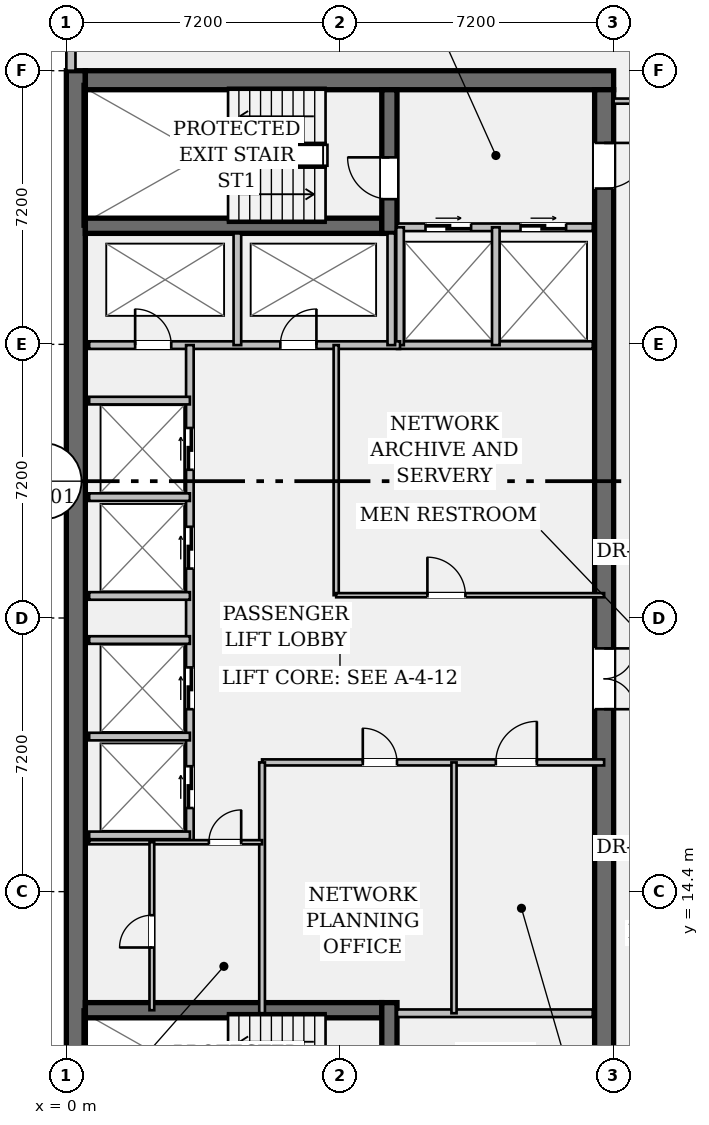
"""IFC4 building model, lengths in metres.
Left out: names, types, materials, properties, quantities, classifications, styles, units other than length and angle.
Written with IfcOpenShell. Run it as: python <this file> out.ifc"""

import sys

from ifc_helpers import new_model, si_unit, direction, frame, frame_2d, origin, place, context, subcontext, project, spatial, rectangle, extrude, element, fill, save


model = new_model("IFC4")
c1 = context("Model", 3, precision=1e-05, world=origin(), true_north=direction((0.0, 1.0)))
c2 = subcontext(c1, "Body", "Model", "MODEL_VIEW")
j1 = project(units=[si_unit("LENGTHUNIT", "METRE"), si_unit("PLANEANGLEUNIT", "RADIAN")], contexts=[c1])
p1 = place(None, origin())
s1 = spatial("IfcSite", under=j1, at=p1, CompositionType="ELEMENT")
p2 = place(p1, origin())
s2 = spatial("IfcBuilding", under=s1, at=p2, CompositionType="ELEMENT")
p3 = place(p2, frame((0.0, 0.0, 222.25)))
s3 = spatial("IfcBuildingStorey", under=s2, at=p3, CompositionType="ELEMENT", Elevation=222.25)
p4 = place(p3, frame((0.25, 7.2, 0.0), z_axis=(0.0, 0.0, 1.0), x_axis=(0.0, 1.0, 0.0)))
e1 = element("IfcWall", 1, at=p4, inside=s3, PredefinedType="SHEAR", context=c2, shape_type="SweptSolid", body=[
    extrude(rectangle(XDim=28.8, YDim=0.5, at=frame_2d((14.4, 0.0))), origin(), (0.0, 0.0, 1.0), 3.24),
])
p5 = place(p3, frame((0.5, 35.75, 0.0), z_axis=(0.0, 0.0, 1.0), x_axis=(1.0, 0.0, 0.0)))
e2 = element("IfcWall", 2, at=p5, inside=s3, PredefinedType="SHEAR", context=c2, shape_type="SweptSolid", body=[
    extrude(rectangle(XDim=13.9, YDim=0.5, at=frame_2d((6.95, 0.0))), origin(), (0.0, 0.0, 1.0), 3.24),
])
p6 = place(p3, frame((14.15, 35.5, 0.0), z_axis=(0.0, 0.0, 1.0), x_axis=(0.0, -1.0, 0.0)))
e3 = element("IfcWall", 3, at=p6, inside=s3, PredefinedType="SHEAR", context=c2, shape_type="SweptSolid", body=[
    extrude(rectangle(XDim=27.8, YDim=0.5, at=frame_2d((13.9, 0.0))), origin(), (0.0, 0.0, 1.0), 3.24),
])
p7 = place(p6, frame((1.4, 0.0, 0.0)))
e4 = element("IfcOpeningElement", 4, at=p7, cuts=e3, PredefinedType="OPENING", context=c2, shape_type="SweptSolid", body=[
    extrude(rectangle(XDim=1.2, YDim=2.15, at=frame_2d((0.6, 1.075))), frame((0.0, 0.262, 0.0), z_axis=(0.0, -1.0, 0.0), x_axis=(1.0, 0.0, 0.0)), (0.0, 0.0, 1.0), 0.524),
])
p8 = place(p6, frame((25.35, 0.0, 0.0)))
e5 = element("IfcOpeningElement", 5, at=p8, cuts=e3, PredefinedType="OPENING", context=c2, shape_type="SweptSolid", body=[
    extrude(rectangle(XDim=1.2, YDim=2.15, at=frame_2d((0.6, 1.075))), frame((0.0, 0.262, 0.0), z_axis=(0.0, -1.0, 0.0), x_axis=(1.0, 0.0, 0.0)), (0.0, 0.0, 1.0), 0.524),
])
p9 = place(p6, frame((14.7, 0.0, 0.0)))
e6 = element("IfcOpeningElement", 6, at=p9, cuts=e3, PredefinedType="OPENING", context=c2, shape_type="SweptSolid", body=[
    extrude(rectangle(XDim=1.6, YDim=2.2, at=frame_2d((0.8, 1.1))), frame((0.0, 0.262, 0.0), z_axis=(0.0, -1.0, 0.0), x_axis=(1.0, 0.0, 0.0)), (0.0, 0.0, 1.0), 0.524),
])
for number, where, z_axis, x_axis in (
    (7, (0.5, 31.92, 0.0), (0.0, 0.0, 1.0), (1.0, 0.0, 0.0)),
    (8, (0.5, 11.28, 0.0), (0.0, 0.0, 1.0), (1.0, 0.0, 0.0)),
):
    element("IfcWall", number, at=place(p3, frame(where, z_axis=z_axis, x_axis=x_axis)), inside=s3, PredefinedType="SHEAR", context=c2, shape_type="SweptSolid", body=[
        extrude(rectangle(XDim=7.8, YDim=0.4, at=frame_2d((3.9, 0.0))), origin(), (0.0, 0.0, 1.0), 3.24),
    ])
p10 = place(p3, frame((8.5, 31.72, 0.0), z_axis=(0.0, 0.0, 1.0), x_axis=(0.0, 1.0, 0.0)))
e9 = element("IfcWall", 9, at=p10, inside=s3, PredefinedType="SHEAR", context=c2, shape_type="SweptSolid", body=[
    extrude(rectangle(XDim=3.78, YDim=0.4, at=frame_2d((1.89, 0.0))), origin(), (0.0, 0.0, 1.0), 3.24),
])
p11 = place(p10, frame((0.9, 0.0, 0.0)))
e10 = element("IfcOpeningElement", 10, at=p11, cuts=e9, PredefinedType="OPENING", context=c2, shape_type="SweptSolid", body=[
    extrude(rectangle(XDim=1.1, YDim=2.15, at=frame_2d((0.55, 1.075))), frame((0.0, 0.212, 0.0), z_axis=(0.0, -1.0, 0.0), x_axis=(1.0, 0.0, 0.0)), (0.0, 0.0, 1.0), 0.424),
])
p12 = place(p3, frame((8.5, 7.7, 0.0), z_axis=(0.0, 0.0, 1.0), x_axis=(0.0, 1.0, 0.0)))
e11 = element("IfcWall", 11, at=p12, inside=s3, PredefinedType="SHEAR", context=c2, shape_type="SweptSolid", body=[
    extrude(rectangle(XDim=3.78, YDim=0.4, at=frame_2d((1.89, 0.0))), origin(), (0.0, 0.0, 1.0), 3.24),
])
p13 = place(p12, frame((0.85, 0.0, 0.0)))
e12 = element("IfcOpeningElement", 12, at=p13, cuts=e11, PredefinedType="OPENING", context=c2, shape_type="SweptSolid", body=[
    extrude(rectangle(XDim=1.1, YDim=2.15, at=frame_2d((0.55, 1.075))), frame((0.0, 0.212, 0.0), z_axis=(0.0, -1.0, 0.0), x_axis=(1.0, 0.0, 0.0)), (0.0, 0.0, 1.0), 0.424),
])
p14 = place(p3, frame((0.12, 36.0, 0.0), z_axis=(0.0, 0.0, 1.0), x_axis=(0.0, 1.0, 0.0)))
e13 = element("IfcWall", 13, at=p14, inside=s3, PredefinedType="STANDARD", context=c2, shape_type="SweptSolid", body=[
    extrude(rectangle(XDim=1.21, YDim=0.24, at=frame_2d((0.605, 0.0))), origin(), (0.0, 0.0, 1.0), 3.24),
])
p15 = place(p3, frame((8.7, 31.88, 0.0), z_axis=(0.0, 0.0, 1.0), x_axis=(1.0, 0.0, 0.0)))
e14 = element("IfcWall", 14, at=p15, inside=s3, PredefinedType="PARTITIONING", context=c2, shape_type="SweptSolid", body=[
    extrude(rectangle(XDim=5.15, YDim=0.2, at=frame_2d((2.575, 0.0))), origin(), (0.0, 0.0, 1.0), 3.24),
])
p16 = place(p15, frame((0.75, 0.0, 0.0)))
e15 = element("IfcOpeningElement", 15, at=p16, cuts=e14, PredefinedType="OPENING", context=c2, shape_type="SweptSolid", body=[
    extrude(rectangle(XDim=1.2, YDim=2.2, at=frame_2d((0.6, 1.1))), frame((0.0, 0.112, 0.0), z_axis=(0.0, -1.0, 0.0), x_axis=(1.0, 0.0, 0.0)), (0.0, 0.0, 1.0), 0.224),
])
p17 = place(p15, frame((3.25, 0.0, 0.0)))
e16 = element("IfcOpeningElement", 16, at=p17, cuts=e14, PredefinedType="OPENING", context=c2, shape_type="SweptSolid", body=[
    extrude(rectangle(XDim=1.2, YDim=2.2, at=frame_2d((0.6, 1.1))), frame((0.0, 0.112, 0.0), z_axis=(0.0, -1.0, 0.0), x_axis=(1.0, 0.0, 0.0)), (0.0, 0.0, 1.0), 0.224),
])
for number, where, z_axis, x_axis in (
    (17, (8.7, 11.2, 0.0), (0.0, 0.0, 1.0), (1.0, 0.0, 0.0)),
    (18, (8.7, 28.78, 0.0), (0.0, 0.0, 1.0), (1.0, 0.0, 0.0)),
):
    element("IfcWall", number, at=place(p3, frame(where, z_axis=z_axis, x_axis=x_axis)), inside=s3, PredefinedType="PARTITIONING", context=c2, shape_type="SweptSolid", body=[
        extrude(rectangle(XDim=5.15, YDim=0.2, at=frame_2d((2.575, 0.0))), origin(), (0.0, 0.0, 1.0), 3.24),
    ])
for number, where, z_axis, x_axis in (
    (19, (8.78, 28.78, 0.0), (0.0, 0.0, 1.0), (0.0, 1.0, 0.0)),
    (20, (11.3, 28.78, 0.0), (0.0, 0.0, 1.0), (0.0, 1.0, 0.0)),
):
    element("IfcWall", number, at=place(p3, frame(where, z_axis=z_axis, x_axis=x_axis)), inside=s3, PredefinedType="PARTITIONING", context=c2, shape_type="SweptSolid", body=[
        extrude(rectangle(XDim=3.1, YDim=0.2, at=frame_2d((1.55, 0.0))), origin(), (0.0, 0.0, 1.0), 3.24),
    ])
p18 = place(p3, frame((0.6, 28.78, 0.0), z_axis=(0.0, 0.0, 1.0), x_axis=(1.0, 0.0, 0.0)))
e21 = element("IfcWall", 21, at=p18, inside=s3, PredefinedType="PARTITIONING", context=c2, shape_type="SweptSolid", body=[
    extrude(rectangle(XDim=8.18, YDim=0.2, at=frame_2d((4.09, 0.0))), origin(), (0.0, 0.0, 1.0), 3.24),
])
p19 = place(p18, frame((1.21, 0.0, 0.0)))
e22 = element("IfcOpeningElement", 22, at=p19, cuts=e21, PredefinedType="OPENING", context=c2, shape_type="SweptSolid", body=[
    extrude(rectangle(XDim=0.95, YDim=2.15, at=frame_2d((0.475, 1.075))), frame((0.0, 0.112, 0.0), z_axis=(0.0, -1.0, 0.0), x_axis=(1.0, 0.0, 0.0)), (0.0, 0.0, 1.0), 0.224),
])
p20 = place(p18, frame((5.03, 0.0, 0.0)))
e23 = element("IfcOpeningElement", 23, at=p20, cuts=e21, PredefinedType="OPENING", context=c2, shape_type="SweptSolid", body=[
    extrude(rectangle(XDim=0.95, YDim=2.15, at=frame_2d((0.475, 1.075))), frame((0.0, 0.112, 0.0), z_axis=(0.0, -1.0, 0.0), x_axis=(1.0, 0.0, 0.0)), (0.0, 0.0, 1.0), 0.224),
])
for number, where, z_axis, x_axis in (
    (24, (4.5, 28.78, 0.0), (0.0, 0.0, 1.0), (0.0, 1.0, 0.0)),
    (25, (8.55, 28.78, 0.0), (0.0, 0.0, 1.0), (0.0, 1.0, 0.0)),
):
    element("IfcWall", number, at=place(p3, frame(where, z_axis=z_axis, x_axis=x_axis)), inside=s3, PredefinedType="PARTITIONING", context=c2, shape_type="SweptSolid", body=[
        extrude(rectangle(XDim=2.94, YDim=0.2, at=frame_2d((1.47, 0.0))), origin(), (0.0, 0.0, 1.0), 3.24),
    ])
p21 = place(p3, frame((3.25, 15.7, 0.0), z_axis=(0.0, 0.0, 1.0), x_axis=(0.0, 1.0, 0.0)))
e26 = element("IfcWall", 26, at=p21, inside=s3, PredefinedType="PARTITIONING", context=c2, shape_type="SweptSolid", body=[
    extrude(rectangle(XDim=13.08, YDim=0.2, at=frame_2d((6.54, 0.0))), origin(), (0.0, 0.0, 1.0), 3.24),
])
p22 = place(p21, frame((0.9, 0.0, 0.0)))
e27 = element("IfcOpeningElement", 27, at=p22, cuts=e26, PredefinedType="OPENING", context=c2, shape_type="SweptSolid", body=[
    extrude(rectangle(XDim=1.1, YDim=2.2, at=frame_2d((0.55, 1.1))), frame((0.0, 0.112, 0.0), z_axis=(0.0, -1.0, 0.0), x_axis=(1.0, 0.0, 0.0)), (0.0, 0.0, 1.0), 0.224),
])
p23 = place(p21, frame((3.5, 0.0, 0.0)))
e28 = element("IfcOpeningElement", 28, at=p23, cuts=e26, PredefinedType="OPENING", context=c2, shape_type="SweptSolid", body=[
    extrude(rectangle(XDim=1.1, YDim=2.2, at=frame_2d((0.55, 1.1))), frame((0.0, 0.112, 0.0), z_axis=(0.0, -1.0, 0.0), x_axis=(1.0, 0.0, 0.0)), (0.0, 0.0, 1.0), 0.224),
])
p24 = place(p21, frame((7.2, 0.0, 0.0)))
e29 = element("IfcOpeningElement", 29, at=p24, cuts=e26, PredefinedType="OPENING", context=c2, shape_type="SweptSolid", body=[
    extrude(rectangle(XDim=1.1, YDim=2.2, at=frame_2d((0.55, 1.1))), frame((0.0, 0.112, 0.0), z_axis=(0.0, -1.0, 0.0), x_axis=(1.0, 0.0, 0.0)), (0.0, 0.0, 1.0), 0.224),
])
p25 = place(p21, frame((9.8, 0.0, 0.0)))
e30 = element("IfcOpeningElement", 30, at=p25, cuts=e26, PredefinedType="OPENING", context=c2, shape_type="SweptSolid", body=[
    extrude(rectangle(XDim=1.1, YDim=2.2, at=frame_2d((0.55, 1.1))), frame((0.0, 0.112, 0.0), z_axis=(0.0, -1.0, 0.0), x_axis=(1.0, 0.0, 0.0)), (0.0, 0.0, 1.0), 0.224),
])
for number, where, z_axis, x_axis in (
    (31, (0.6, 15.88, 0.0), (0.0, 0.0, 1.0), (1.0, 0.0, 0.0)),
    (32, (0.6, 18.48, 0.0), (0.0, 0.0, 1.0), (1.0, 0.0, 0.0)),
    (33, (0.6, 22.18, 0.0), (0.0, 0.0, 1.0), (1.0, 0.0, 0.0)),
    (34, (0.6, 24.78, 0.0), (0.0, 0.0, 1.0), (1.0, 0.0, 0.0)),
    (35, (0.6, 21.02, 0.0), (0.0, 0.0, 1.0), (1.0, 0.0, 0.0)),
    (36, (0.6, 27.32, 0.0), (0.0, 0.0, 1.0), (1.0, 0.0, 0.0)),
):
    element("IfcWall", number, at=place(p3, frame(where, z_axis=z_axis, x_axis=x_axis)), inside=s3, PredefinedType="PARTITIONING", context=c2, shape_type="SweptSolid", body=[
        extrude(rectangle(XDim=2.65, YDim=0.2, at=frame_2d((1.325, 0.0))), origin(), (0.0, 0.0, 1.0), 3.24),
    ])
p26 = place(p3, frame((7.1, 22.2, 0.0), z_axis=(0.0, 0.0, 1.0), x_axis=(0.0, 1.0, 0.0)))
e37 = element("IfcWall", 37, at=p26, inside=s3, PredefinedType="PARTITIONING", context=c2, shape_type="SweptSolid", body=[
    extrude(rectangle(XDim=6.58, YDim=0.135, at=frame_2d((3.29, 0.0))), origin(), (0.0, 0.0, 1.0), 3.24),
])
p27 = place(p3, frame((7.1, 22.2, 0.0), z_axis=(0.0, 0.0, 1.0), x_axis=(1.0, 0.0, 0.0)))
e38 = element("IfcWall", 38, at=p27, inside=s3, PredefinedType="PARTITIONING", context=c2, shape_type="SweptSolid", body=[
    extrude(rectangle(XDim=7.05, YDim=0.11, at=frame_2d((3.525, 0.0))), origin(), (0.0, 0.0, 1.0), 3.24),
])
p28 = place(p27, frame((2.4, 0.0, 0.0)))
e39 = element("IfcOpeningElement", 39, at=p28, cuts=e38, PredefinedType="OPENING", context=c2, shape_type="SweptSolid", body=[
    extrude(rectangle(XDim=1.0, YDim=2.15, at=frame_2d((0.5, 1.075))), frame((0.0, 0.067, 0.0), z_axis=(0.0, -1.0, 0.0), x_axis=(1.0, 0.0, 0.0)), (0.0, 0.0, 1.0), 0.134),
])
p29 = place(p3, frame((5.15, 17.8, 0.0), z_axis=(0.0, 0.0, 1.0), x_axis=(1.0, 0.0, 0.0)))
e40 = element("IfcWall", 40, at=p29, inside=s3, PredefinedType="PARTITIONING", context=c2, shape_type="SweptSolid", body=[
    extrude(rectangle(XDim=9.0, YDim=0.16, at=frame_2d((4.5, 0.0))), origin(), (0.0, 0.0, 1.0), 3.24),
])
p30 = place(p29, frame((2.65, 0.0, 0.0)))
e41 = element("IfcOpeningElement", 41, at=p30, cuts=e40, PredefinedType="OPENING", context=c2, shape_type="SweptSolid", body=[
    extrude(rectangle(XDim=0.9, YDim=2.15, at=frame_2d((0.45, 1.075))), frame((0.0, 0.092, 0.0), z_axis=(0.0, -1.0, 0.0), x_axis=(1.0, 0.0, 0.0)), (0.0, 0.0, 1.0), 0.184),
])
p31 = place(p29, frame((6.15, 0.0, 0.0)))
e42 = element("IfcOpeningElement", 42, at=p31, cuts=e40, PredefinedType="OPENING", context=c2, shape_type="SweptSolid", body=[
    extrude(rectangle(XDim=1.08, YDim=2.15, at=frame_2d((0.54, 1.075))), frame((0.0, 0.092, 0.0), z_axis=(0.0, -1.0, 0.0), x_axis=(1.0, 0.0, 0.0)), (0.0, 0.0, 1.0), 0.184),
])
p32 = place(p3, frame((5.15, 11.2, 0.0), z_axis=(0.0, 0.0, 1.0), x_axis=(0.0, 1.0, 0.0)))
e43 = element("IfcWall", 43, at=p32, inside=s3, PredefinedType="PARTITIONING", context=c2, shape_type="SweptSolid", body=[
    extrude(rectangle(XDim=6.6, YDim=0.15, at=frame_2d((3.3, 0.0))), origin(), (0.0, 0.0, 1.0), 3.24),
])
p33 = place(p3, frame((10.2, 11.2, 0.0), z_axis=(0.0, 0.0, 1.0), x_axis=(0.0, 1.0, 0.0)))
e44 = element("IfcWall", 44, at=p33, inside=s3, PredefinedType="PARTITIONING", context=c2, shape_type="SweptSolid", body=[
    extrude(rectangle(XDim=6.6, YDim=0.135, at=frame_2d((3.3, 0.0))), origin(), (0.0, 0.0, 1.0), 3.24),
])
p34 = place(p3, frame((0.6, 15.7, 0.0), z_axis=(0.0, 0.0, 1.0), x_axis=(1.0, 0.0, 0.0)))
e45 = element("IfcWall", 45, at=p34, inside=s3, PredefinedType="PARTITIONING", context=c2, shape_type="SweptSolid", body=[
    extrude(rectangle(XDim=4.55, YDim=0.11, at=frame_2d((2.275, 0.0))), origin(), (0.0, 0.0, 1.0), 3.24),
])
p35 = place(p34, frame((3.15, 0.0, 0.0)))
e46 = element("IfcOpeningElement", 46, at=p35, cuts=e45, PredefinedType="OPENING", context=c2, shape_type="SweptSolid", body=[
    extrude(rectangle(XDim=0.85, YDim=2.15, at=frame_2d((0.425, 1.075))), frame((0.0, 0.067, 0.0), z_axis=(0.0, -1.0, 0.0), x_axis=(1.0, 0.0, 0.0)), (0.0, 0.0, 1.0), 0.134),
])
p36 = place(p3, frame((2.25, 11.28, 0.0), z_axis=(0.0, 0.0, 1.0), x_axis=(0.0, 1.0, 0.0)))
e47 = element("IfcWall", 47, at=p36, inside=s3, PredefinedType="PARTITIONING", context=c2, shape_type="SweptSolid", body=[
    extrude(rectangle(XDim=4.42, YDim=0.125, at=frame_2d((2.21, 0.0))), origin(), (0.0, 0.0, 1.0), 3.24),
])
p37 = place(p36, frame((1.65, 0.0, 0.0)))
e48 = element("IfcOpeningElement", 48, at=p37, cuts=e47, PredefinedType="OPENING", context=c2, shape_type="SweptSolid", body=[
    extrude(rectangle(XDim=0.85, YDim=2.15, at=frame_2d((0.425, 1.075))), frame((0.0, 0.074, 0.0), z_axis=(0.0, -1.0, 0.0), x_axis=(1.0, 0.0, 0.0)), (0.0, 0.0, 1.0), 0.149),
])
p38 = place(p3, frame((14.4, 35.2, 0.0), z_axis=(0.0, 0.0, 1.0), x_axis=(1.0, 0.0, 0.0)))
e49 = element("IfcWall", 49, at=p38, inside=s3, PredefinedType="PARTITIONING", context=c2, shape_type="SweptSolid", body=[
    extrude(rectangle(XDim=2.95, YDim=0.135, at=frame_2d((1.475, 0.0))), origin(), (0.0, 0.0, 1.0), 2.808),
])
p39 = place(p38, frame((0.95, 0.0, 0.0)))
e50 = element("IfcOpeningElement", 50, at=p39, cuts=e49, PredefinedType="OPENING", context=c2, shape_type="SweptSolid", body=[
    extrude(rectangle(XDim=1.0, YDim=2.15, at=frame_2d((0.5, 1.075))), frame((0.0, 0.08, 0.0), z_axis=(0.0, -1.0, 0.0), x_axis=(1.0, 0.0, 0.0)), (0.0, 0.0, 1.0), 0.159),
])
p40 = place(p11, origin())
e51 = element("IfcDoor", 51, at=p40, inside=s3, OperationType="SINGLE_SWING_RIGHT", PredefinedType="DOOR", context=c2, shape_type="SweptSolid", body=[
    extrude(rectangle(XDim=1.1, YDim=2.15, at=frame_2d((0.55, 1.075))), frame((0.0, 0.025, 0.0), z_axis=(0.0, -1.0, 0.0), x_axis=(1.0, 0.0, 0.0)), (0.0, 0.0, 1.0), 0.05),
])
fill(e10, e51)
p41 = place(p7, origin())
e52 = element("IfcDoor", 52, at=p41, inside=s3, OperationType="SINGLE_SWING_LEFT", PredefinedType="DOOR", context=c2, shape_type="SweptSolid", body=[
    extrude(rectangle(XDim=1.2, YDim=2.15, at=frame_2d((0.6, 1.075))), frame((0.0, 0.025, 0.0), z_axis=(0.0, -1.0, 0.0), x_axis=(1.0, 0.0, 0.0)), (0.0, 0.0, 1.0), 0.05),
])
fill(e4, e52)
p42 = place(p16, origin())
e53 = element("IfcDoor", 53, at=p42, inside=s3, OperationType="DOUBLE_DOOR_SLIDING", PredefinedType="DOOR", context=c2, shape_type="SweptSolid", body=[
    extrude(rectangle(XDim=1.2, YDim=2.2, at=frame_2d((0.6, 1.1))), frame((0.0, 0.025, 0.0), z_axis=(0.0, -1.0, 0.0), x_axis=(1.0, 0.0, 0.0)), (0.0, 0.0, 1.0), 0.05),
])
fill(e15, e53)
p43 = place(p17, origin())
e54 = element("IfcDoor", 54, at=p43, inside=s3, OperationType="DOUBLE_DOOR_SLIDING", PredefinedType="DOOR", context=c2, shape_type="SweptSolid", body=[
    extrude(rectangle(XDim=1.2, YDim=2.2, at=frame_2d((0.6, 1.1))), frame((0.0, 0.025, 0.0), z_axis=(0.0, -1.0, 0.0), x_axis=(1.0, 0.0, 0.0)), (0.0, 0.0, 1.0), 0.05),
])
fill(e16, e54)
p44 = place(p19, origin())
e55 = element("IfcDoor", 55, at=p44, inside=s3, OperationType="SINGLE_SWING_LEFT", PredefinedType="DOOR", context=c2, shape_type="SweptSolid", body=[
    extrude(rectangle(XDim=0.95, YDim=2.15, at=frame_2d((0.475, 1.075))), frame((0.0, 0.025, 0.0), z_axis=(0.0, -1.0, 0.0), x_axis=(1.0, 0.0, 0.0)), (0.0, 0.0, 1.0), 0.05),
])
fill(e22, e55)
p45 = place(p20, origin())
e56 = element("IfcDoor", 56, at=p45, inside=s3, OperationType="SINGLE_SWING_RIGHT", PredefinedType="DOOR", context=c2, shape_type="SweptSolid", body=[
    extrude(rectangle(XDim=0.95, YDim=2.15, at=frame_2d((0.475, 1.075))), frame((0.0, 0.025, 0.0), z_axis=(0.0, -1.0, 0.0), x_axis=(1.0, 0.0, 0.0)), (0.0, 0.0, 1.0), 0.05),
])
fill(e23, e56)
p46 = place(p9, origin())
e57 = element("IfcDoor", 57, at=p46, inside=s3, OperationType="DOUBLE_DOOR_SINGLE_SWING", PredefinedType="DOOR", context=c2, shape_type="SweptSolid", body=[
    extrude(rectangle(XDim=1.6, YDim=2.2, at=frame_2d((0.8, 1.1))), frame((0.0, 0.025, 0.0), z_axis=(0.0, -1.0, 0.0), x_axis=(1.0, 0.0, 0.0)), (0.0, 0.0, 1.0), 0.05),
])
fill(e6, e57)
p47 = place(p22, origin())
e58 = element("IfcDoor", 58, at=p47, inside=s3, OperationType="DOUBLE_DOOR_SLIDING", PredefinedType="DOOR", context=c2, shape_type="SweptSolid", body=[
    extrude(rectangle(XDim=1.1, YDim=2.2, at=frame_2d((0.55, 1.1))), frame((0.0, 0.025, 0.0), z_axis=(0.0, -1.0, 0.0), x_axis=(1.0, 0.0, 0.0)), (0.0, 0.0, 1.0), 0.05),
])
fill(e27, e58)
p48 = place(p23, origin())
e59 = element("IfcDoor", 59, at=p48, inside=s3, OperationType="DOUBLE_DOOR_SLIDING", PredefinedType="DOOR", context=c2, shape_type="SweptSolid", body=[
    extrude(rectangle(XDim=1.1, YDim=2.2, at=frame_2d((0.55, 1.1))), frame((0.0, 0.025, 0.0), z_axis=(0.0, -1.0, 0.0), x_axis=(1.0, 0.0, 0.0)), (0.0, 0.0, 1.0), 0.05),
])
fill(e28, e59)
p49 = place(p24, origin())
e60 = element("IfcDoor", 60, at=p49, inside=s3, OperationType="DOUBLE_DOOR_SLIDING", PredefinedType="DOOR", context=c2, shape_type="SweptSolid", body=[
    extrude(rectangle(XDim=1.1, YDim=2.2, at=frame_2d((0.55, 1.1))), frame((0.0, 0.025, 0.0), z_axis=(0.0, -1.0, 0.0), x_axis=(1.0, 0.0, 0.0)), (0.0, 0.0, 1.0), 0.05),
])
fill(e29, e60)
p50 = place(p25, origin())
e61 = element("IfcDoor", 61, at=p50, inside=s3, OperationType="DOUBLE_DOOR_SLIDING", PredefinedType="DOOR", context=c2, shape_type="SweptSolid", body=[
    extrude(rectangle(XDim=1.1, YDim=2.2, at=frame_2d((0.55, 1.1))), frame((0.0, 0.025, 0.0), z_axis=(0.0, -1.0, 0.0), x_axis=(1.0, 0.0, 0.0)), (0.0, 0.0, 1.0), 0.05),
])
fill(e30, e61)
p51 = place(p28, origin())
e62 = element("IfcDoor", 62, at=p51, inside=s3, OperationType="SINGLE_SWING_LEFT", PredefinedType="DOOR", context=c2, shape_type="SweptSolid", body=[
    extrude(rectangle(XDim=1.0, YDim=2.15, at=frame_2d((0.5, 1.075))), frame((0.0, 0.025, 0.0), z_axis=(0.0, -1.0, 0.0), x_axis=(1.0, 0.0, 0.0)), (0.0, 0.0, 1.0), 0.05),
])
fill(e39, e62)
p52 = place(p30, origin())
e63 = element("IfcDoor", 63, at=p52, inside=s3, OperationType="SINGLE_SWING_LEFT", PredefinedType="DOOR", context=c2, shape_type="SweptSolid", body=[
    extrude(rectangle(XDim=0.9, YDim=2.15, at=frame_2d((0.45, 1.075))), frame((0.0, 0.025, 0.0), z_axis=(0.0, -1.0, 0.0), x_axis=(1.0, 0.0, 0.0)), (0.0, 0.0, 1.0), 0.05),
])
fill(e41, e63)
p53 = place(p31, origin())
e64 = element("IfcDoor", 64, at=p53, inside=s3, OperationType="SINGLE_SWING_RIGHT", PredefinedType="DOOR", context=c2, shape_type="SweptSolid", body=[
    extrude(rectangle(XDim=1.08, YDim=2.15, at=frame_2d((0.54, 1.075))), frame((0.0, 0.025, 0.0), z_axis=(0.0, -1.0, 0.0), x_axis=(1.0, 0.0, 0.0)), (0.0, 0.0, 1.0), 0.05),
])
fill(e42, e64)
p54 = place(p35, origin())
e65 = element("IfcDoor", 65, at=p54, inside=s3, OperationType="SINGLE_SWING_RIGHT", PredefinedType="DOOR", context=c2, shape_type="SweptSolid", body=[
    extrude(rectangle(XDim=0.85, YDim=2.15, at=frame_2d((0.425, 1.075))), frame((0.0, 0.025, 0.0), z_axis=(0.0, -1.0, 0.0), x_axis=(1.0, 0.0, 0.0)), (0.0, 0.0, 1.0), 0.05),
])
fill(e46, e65)
p55 = place(p37, origin())
e66 = element("IfcDoor", 66, at=p55, inside=s3, OperationType="SINGLE_SWING_LEFT", PredefinedType="DOOR", context=c2, shape_type="SweptSolid", body=[
    extrude(rectangle(XDim=0.85, YDim=2.15, at=frame_2d((0.425, 1.075))), frame((0.0, 0.025, 0.0), z_axis=(0.0, -1.0, 0.0), x_axis=(1.0, 0.0, 0.0)), (0.0, 0.0, 1.0), 0.05),
])
fill(e48, e66)
save(model, sys.argv[1])
